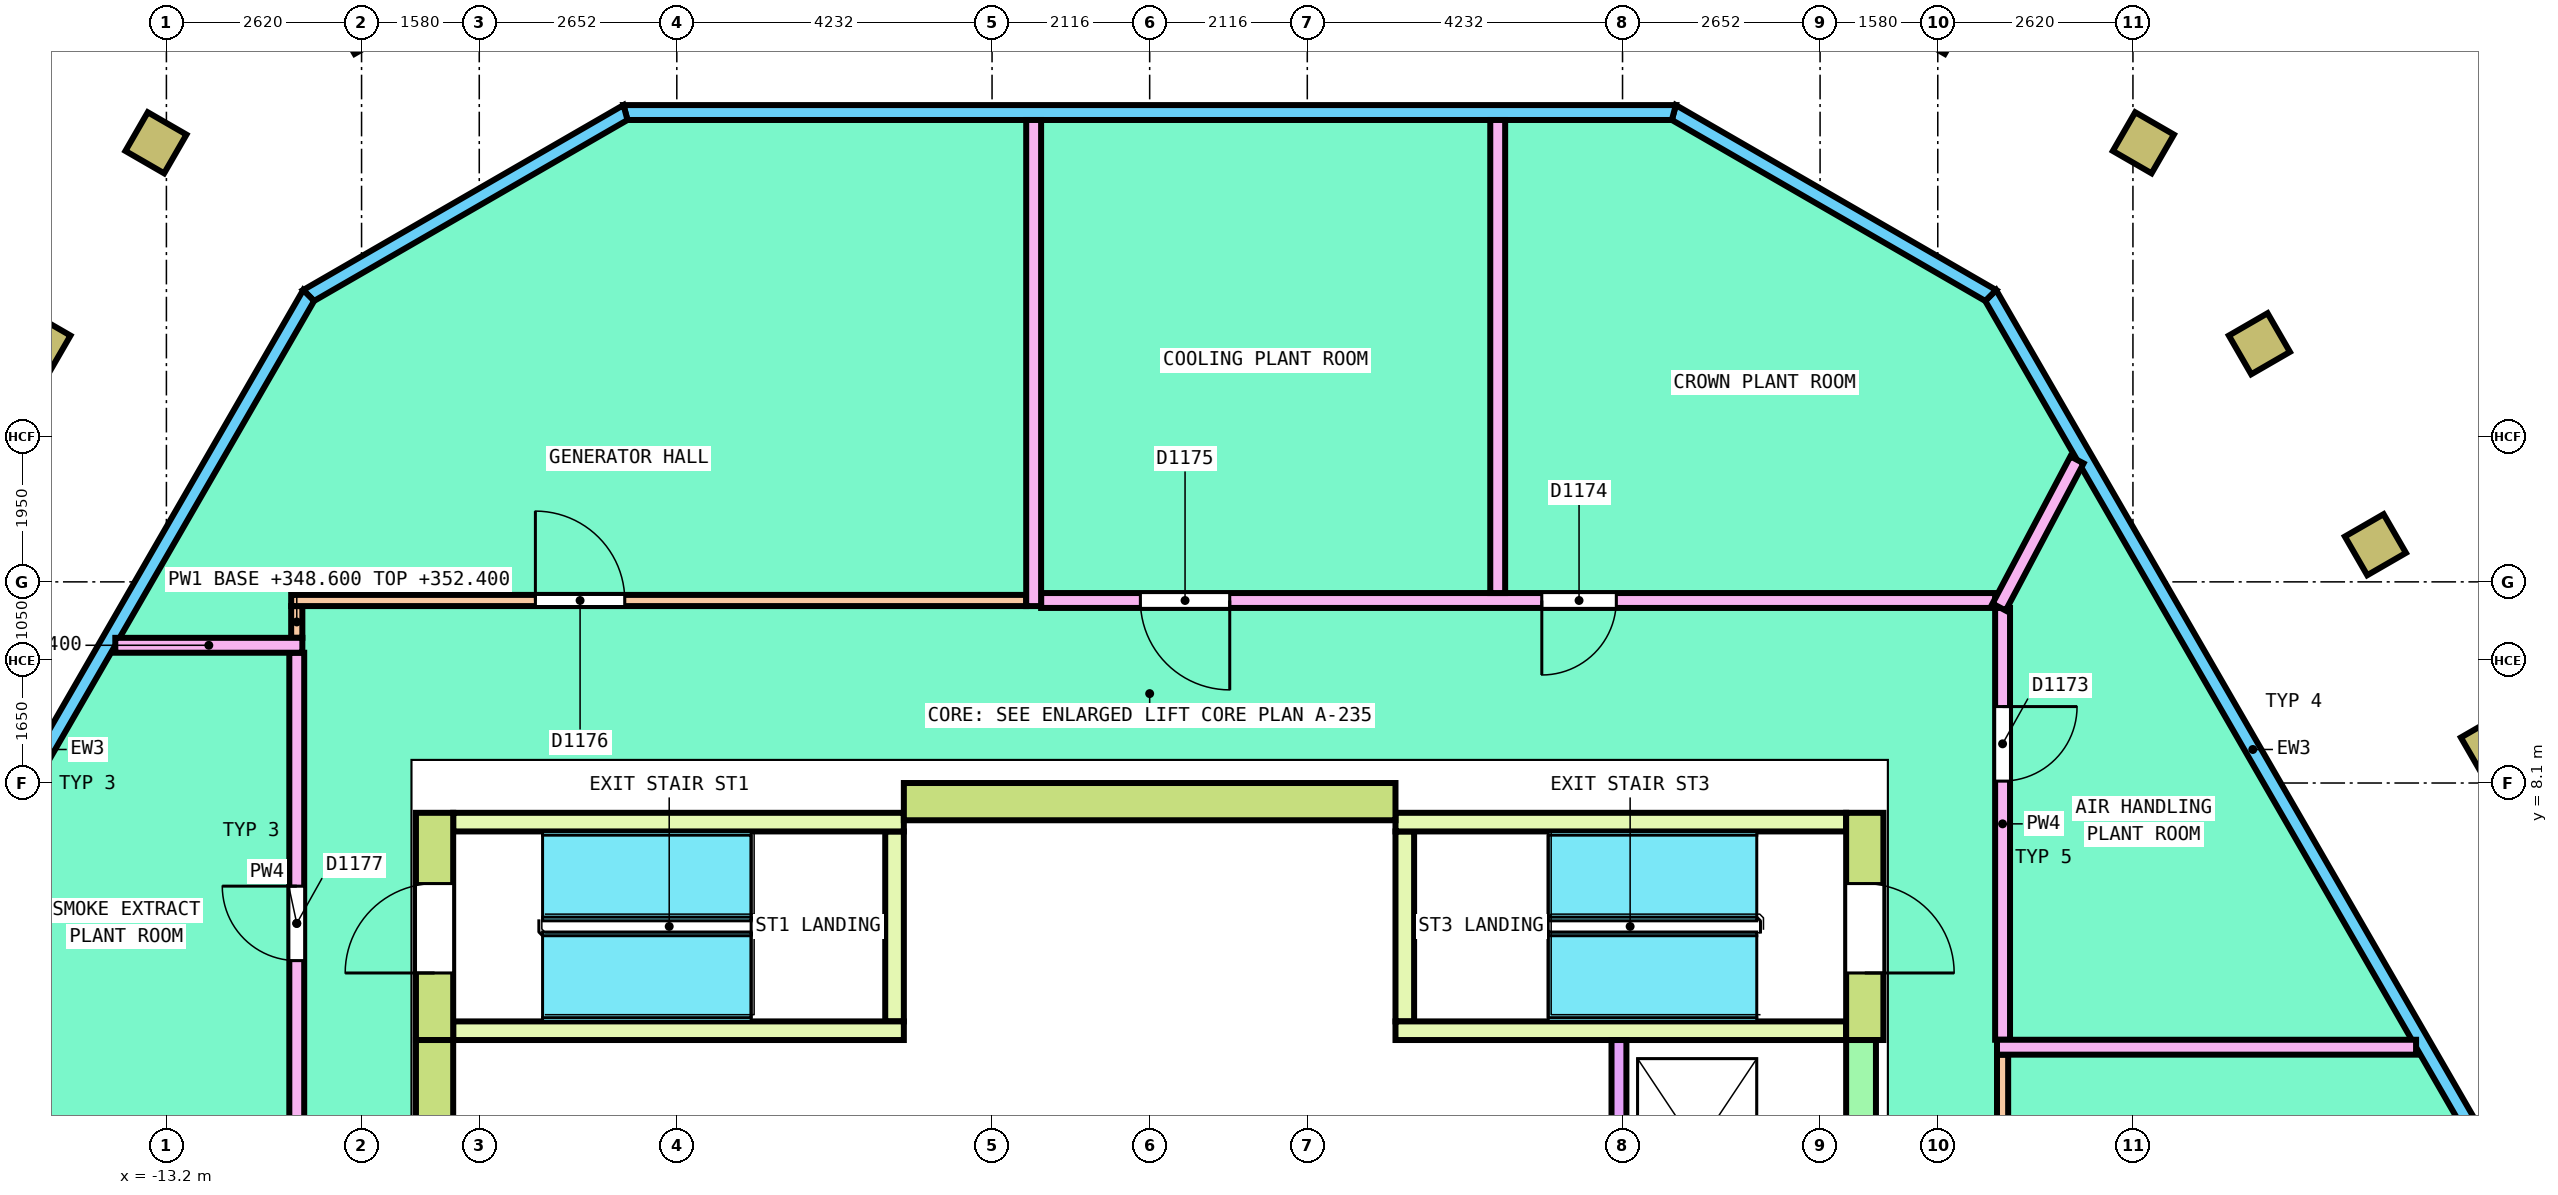
"""IFC4 building model, lengths in metres.
Left out: names, types, materials, properties, quantities, classifications, styles, units other than length and angle.
Written with IfcOpenShell. Run it as: python <this file> out.ifc"""

import sys

from ifc_helpers import new_model, si_unit, direction, frame, frame_2d, origin, origin_2d, place, context, subcontext, project, spatial, polyline, rectangle, hollow_rectangle, outline, extrude, element, fill, save


model = new_model("IFC4")
c1 = context("Model", 3, precision=1e-05, world=origin(), true_north=direction((0.0, 1.0)))
c2 = subcontext(c1, "Body", "Model", "MODEL_VIEW")
j1 = project(units=[si_unit("LENGTHUNIT", "METRE"), si_unit("PLANEANGLEUNIT", "RADIAN")], contexts=[c1])
p1 = place(None, origin())
s1 = spatial("IfcSite", under=j1, at=p1, CompositionType="ELEMENT")
p2 = place(p1, origin())
s2 = spatial("IfcBuilding", under=s1, at=p2, CompositionType="ELEMENT")
p3 = place(p2, frame((0.0, 0.0, 348.6)))
s3 = spatial("IfcBuildingStorey", under=s2, at=p3, CompositionType="ELEMENT", Elevation=348.6)
for number, where, z_axis, x_axis in (
    (1, (18.013, 8.601, 0.0), (0.0, 0.0, 1.0), (-0.5, 0.866, 0.0)),
    (2, (16.455, 11.299, 0.0), (0.0, 0.0, 1.0), (-0.5, 0.866, 0.0)),
    (3, (14.898, 13.996, 0.0), (0.0, 0.0, 1.0), (-0.5, 0.866, 0.0)),
    (4, (13.34, 16.694, 0.0), (0.0, 0.0, 1.0), (-0.866, 0.5, 0.0)),
    (5, (-13.34, 16.694, 0.0), (0.0, 0.0, 1.0), (-0.5, -0.866, 0.0)),
    (6, (-14.898, 13.996, 0.0), (0.0, 0.0, 1.0), (-0.5, -0.866, 0.0)),
):
    element("IfcColumn", number, at=place(p3, frame(where, z_axis=z_axis, x_axis=x_axis)), inside=s3, PredefinedType="COLUMN", context=c2, shape_type="SweptSolid", body=[
        extrude(hollow_rectangle(XDim=0.6, YDim=0.6, WallThickness=0.04, InnerFilletRadius=0.04, OuterFilletRadius=0.08, at=origin_2d()), origin(), (0.0, 0.0, 1.0), 4.0),
    ])
p4 = place(p3, frame((18.327, 2.456, 0.0), z_axis=(0.0, 0.0, 1.0), x_axis=(-0.499991740577, 0.866030172312, 0.0)))
e7 = element("IfcWall", 7, at=p4, inside=s3, PredefinedType="SOLIDWALL", context=c2, shape_type="SweptSolid", body=[
    extrude(outline(polyline([(-0.027, -0.1), (14.101, -0.1), (14.047, 0.1), (0.027, 0.1), (-0.027, -0.1)])), origin(), (0.0, 0.0, 1.0), 3.8),
])
p5 = place(p3, frame((11.291, 14.644, 0.0), z_axis=(0.0, 0.0, 1.0), x_axis=(-0.86601671623, 0.500015046984, 0.0)))
e8 = element("IfcWall", 8, at=p5, inside=s3, PredefinedType="SOLIDWALL", context=c2, shape_type="SweptSolid", body=[
    extrude(outline(polyline([(-0.027, -0.1), (4.938, -0.1), (4.885, 0.1), (0.027, 0.1), (-0.027, -0.1)])), origin(), (0.0, 0.0, 1.0), 3.8),
])
p6 = place(p3, frame((7.037, 17.1, 0.0), z_axis=(0.0, 0.0, 1.0), x_axis=(-1.0, 0.0, 0.0)))
e9 = element("IfcWall", 9, at=p6, inside=s3, PredefinedType="SOLIDWALL", context=c2, shape_type="SweptSolid", body=[
    extrude(outline(polyline([(-0.027, -0.1), (14.101, -0.1), (14.047, 0.1), (0.027, 0.1), (-0.027, -0.1)])), origin(), (0.0, 0.0, 1.0), 3.8),
])
p7 = place(p3, frame((-7.037, 17.1, 0.0), z_axis=(0.0, 0.0, 1.0), x_axis=(-0.86601671623, -0.500015046984, 0.0)))
e10 = element("IfcWall", 10, at=p7, inside=s3, PredefinedType="SOLIDWALL", context=c2, shape_type="SweptSolid", body=[
    extrude(outline(polyline([(-0.027, -0.1), (4.938, -0.1), (4.885, 0.1), (0.027, 0.1), (-0.027, -0.1)])), origin(), (0.0, 0.0, 1.0), 3.8),
])
p8 = place(p3, frame((-11.291, 14.644, 0.0), z_axis=(0.0, 0.0, 1.0), x_axis=(-0.499991740577, -0.866030172312, 0.0)))
e11 = element("IfcWall", 11, at=p8, inside=s3, PredefinedType="SOLIDWALL", context=c2, shape_type="SweptSolid", body=[
    extrude(outline(polyline([(-0.027, -0.1), (14.101, -0.1), (14.047, 0.1), (0.027, 0.1), (-0.027, -0.1)])), origin(), (0.0, 0.0, 1.0), 3.8),
])
p9 = place(p3, frame((3.3, 7.85, 0.0), z_axis=(0.0, 0.0, 1.0), x_axis=(-1.0, 0.0, 0.0)))
e12 = element("IfcWall", 12, at=p9, inside=s3, PredefinedType="SHEAR", context=c2, shape_type="SweptSolid", body=[
    extrude(rectangle(XDim=6.6, YDim=0.5, at=frame_2d((3.3, 0.0))), origin(), (0.0, 0.0, 1.0), 3.8),
])
p10 = place(p3, frame((-9.6, 4.65, 0.0), z_axis=(0.0, 0.0, 1.0), x_axis=(0.0, -1.0, 0.0)))
e13 = element("IfcWall", 13, at=p10, inside=s3, PredefinedType="SHEAR", context=c2, shape_type="SweptSolid", body=[
    extrude(rectangle(XDim=9.3, YDim=0.5, at=frame_2d((4.65, 0.0))), origin(), (0.0, 0.0, 1.0), 3.8),
])
p11 = place(p3, frame((-9.6, 4.65, 0.0), z_axis=(0.0, 0.0, 1.0), x_axis=(0.0, 1.0, 0.0)))
e14 = element("IfcWall", 14, at=p11, inside=s3, PredefinedType="SHEAR", context=c2, shape_type="SweptSolid", body=[
    extrude(rectangle(XDim=3.05, YDim=0.5, at=frame_2d((1.525, 0.0))), origin(), (0.0, 0.0, 1.0), 3.8),
])
p12 = place(p11, frame((0.9, 0.0, 0.0)))
e15 = element("IfcOpeningElement", 15, at=p12, cuts=e14, PredefinedType="OPENING", context=c2, shape_type="SweptSolid", body=[
    extrude(rectangle(XDim=1.2, YDim=2.1, at=frame_2d((0.6, 1.05))), frame((0.0, 0.26, 0.0), z_axis=(0.0, -1.0, 0.0), x_axis=(1.0, 0.0, 0.0)), (0.0, 0.0, 1.0), 0.52),
])
p13 = place(p3, frame((-3.425, 4.9, 0.0), z_axis=(0.0, 0.0, 1.0), x_axis=(0.0, 1.0, 0.0)))
e16 = element("IfcWall", 16, at=p13, inside=s3, PredefinedType="SOLIDWALL", context=c2, shape_type="SweptSolid", body=[
    extrude(rectangle(XDim=2.55, YDim=0.25, at=frame_2d((1.275, 0.0))), origin(), (0.0, 0.0, 1.0), 3.8),
])
for number, where, z_axis, x_axis in (
    (17, (-9.35, 4.775, 0.0), (0.0, 0.0, 1.0), (1.0, 0.0, 0.0)),
    (18, (-9.35, 7.575, 0.0), (0.0, 0.0, 1.0), (1.0, 0.0, 0.0)),
):
    element("IfcWall", number, at=place(p3, frame(where, z_axis=z_axis, x_axis=x_axis)), inside=s3, PredefinedType="SOLIDWALL", context=c2, shape_type="SweptSolid", body=[
        extrude(rectangle(XDim=6.05, YDim=0.25, at=frame_2d((3.025, 0.0))), origin(), (0.0, 0.0, 1.0), 3.8),
    ])
p14 = place(p3, frame((9.6, 4.65, 0.0), z_axis=(0.0, 0.0, 1.0), x_axis=(0.0, 1.0, 0.0)))
e19 = element("IfcWall", 19, at=p14, inside=s3, PredefinedType="SHEAR", context=c2, shape_type="SweptSolid", body=[
    extrude(rectangle(XDim=3.05, YDim=0.5, at=frame_2d((1.525, 0.0))), origin(), (0.0, 0.0, 1.0), 3.8),
])
p15 = place(p14, frame((0.9, 0.0, 0.0)))
e20 = element("IfcOpeningElement", 20, at=p15, cuts=e19, PredefinedType="OPENING", context=c2, shape_type="SweptSolid", body=[
    extrude(rectangle(XDim=1.2, YDim=2.1, at=frame_2d((0.6, 1.05))), frame((0.0, 0.26, 0.0), z_axis=(0.0, -1.0, 0.0), x_axis=(1.0, 0.0, 0.0)), (0.0, 0.0, 1.0), 0.52),
])
p16 = place(p3, frame((3.425, 4.9, 0.0), z_axis=(0.0, 0.0, 1.0), x_axis=(0.0, 1.0, 0.0)))
e21 = element("IfcWall", 21, at=p16, inside=s3, PredefinedType="SOLIDWALL", context=c2, shape_type="SweptSolid", body=[
    extrude(rectangle(XDim=2.55, YDim=0.25, at=frame_2d((1.275, 0.0))), origin(), (0.0, 0.0, 1.0), 3.8),
])
for number, where, z_axis, x_axis in (
    (22, (3.3, 4.775, 0.0), (0.0, 0.0, 1.0), (1.0, 0.0, 0.0)),
    (23, (3.3, 7.575, 0.0), (0.0, 0.0, 1.0), (1.0, 0.0, 0.0)),
):
    element("IfcWall", number, at=place(p3, frame(where, z_axis=z_axis, x_axis=x_axis)), inside=s3, PredefinedType="SOLIDWALL", context=c2, shape_type="SweptSolid", body=[
        extrude(rectangle(XDim=6.05, YDim=0.25, at=frame_2d((3.025, 0.0))), origin(), (0.0, 0.0, 1.0), 3.8),
    ])
p17 = place(p3, frame((6.3, 1.75, 0.0), z_axis=(0.0, 0.0, 1.0), x_axis=(0.0, 1.0, 0.0)))
e24 = element("IfcWall", 24, at=p17, inside=s3, PredefinedType="SOLIDWALL", context=c2, shape_type="SweptSolid", body=[
    extrude(rectangle(XDim=2.9, YDim=0.2, at=frame_2d((1.45, 0.0))), origin(), (0.0, 0.0, 1.0), 3.8),
])
p18 = place(p3, frame((9.55, 1.5, 0.0), z_axis=(0.0, 0.0, 1.0), x_axis=(0.0, 1.0, 0.0)))
e25 = element("IfcWall", 25, at=p18, inside=s3, PredefinedType="SHEAR", context=c2, shape_type="SweptSolid", body=[
    extrude(rectangle(XDim=3.15, YDim=0.4, at=frame_2d((1.575, 0.0))), origin(), (0.0, 0.0, 1.0), 3.8),
])
p19 = place(p3, frame((11.45, -2.383, 0.0), z_axis=(0.0, 0.0, 1.0), x_axis=(0.0, 1.0, 0.0)))
e26 = element("IfcWall", 26, at=p19, inside=s3, PredefinedType="PARTITIONING", context=c2, shape_type="SweptSolid", body=[
    extrude(rectangle(XDim=6.836, YDim=0.15, at=frame_2d((3.418, 0.0))), origin(), (0.0, 0.0, 1.0), 3.3),
])
p20 = place(p19, frame((1.534, 0.0, 0.0)))
e27 = element("IfcOpeningElement", 27, at=p20, cuts=e26, PredefinedType="OPENING", context=c2, shape_type="SweptSolid", body=[
    extrude(rectangle(XDim=1.2, YDim=2.1, at=frame_2d((0.6, 1.05))), frame((0.0, 0.085, 0.0), z_axis=(0.0, -1.0, 0.0), x_axis=(1.0, 0.0, 0.0)), (0.0, 0.0, 1.0), 0.17),
])
p21 = place(p3, frame((-11.45, 10.049, 0.0), z_axis=(0.0, 0.0, 1.0), x_axis=(0.0, 1.0, 0.0)))
e28 = element("IfcWall", 28, at=p21, inside=s3, PredefinedType="PARTITIONING", context=c2, shape_type="SweptSolid", body=[
    extrude(rectangle(XDim=0.426, YDim=0.15, at=frame_2d((0.213, 0.0))), origin(), (0.0, 0.0, 1.0), 3.8),
])
p22 = place(p3, frame((-11.525, 10.55, 0.0), z_axis=(0.0, 0.0, 1.0), x_axis=(1.0, 0.0, 0.0)))
e29 = element("IfcWall", 29, at=p22, inside=s3, PredefinedType="PARTITIONING", context=c2, shape_type="SweptSolid", body=[
    extrude(rectangle(XDim=9.867, YDim=0.15, at=frame_2d((4.934, 0.0))), origin(), (0.0, 0.0, 1.0), 3.3),
])
p23 = place(p22, frame((3.279, 0.0, 0.0)))
e30 = element("IfcOpeningElement", 30, at=p23, cuts=e29, PredefinedType="OPENING", context=c2, shape_type="SweptSolid", body=[
    extrude(rectangle(XDim=1.2, YDim=2.1, at=frame_2d((0.6, 1.05))), frame((0.0, 0.085, 0.0), z_axis=(0.0, -1.0, 0.0), x_axis=(1.0, 0.0, 0.0)), (0.0, 0.0, 1.0), 0.17),
])
p24 = place(p3, frame((11.45, 4.654, 0.0), z_axis=(0.0, 0.0, 1.0), x_axis=(0.0, 1.0, 0.0)))
e31 = element("IfcWall", 31, at=p24, inside=s3, PredefinedType="PARTITIONING", context=c2, shape_type="SweptSolid", body=[
    extrude(rectangle(XDim=5.796, YDim=0.2, at=frame_2d((2.898, 0.0))), origin(), (0.0, 0.0, 1.0), 3.3),
])
p25 = place(p24, frame((3.472, 0.0, 0.0)))
e32 = element("IfcOpeningElement", 32, at=p25, cuts=e31, PredefinedType="OPENING", context=c2, shape_type="SweptSolid", body=[
    extrude(rectangle(XDim=1.0, YDim=2.1, at=frame_2d((0.5, 1.05))), frame((0.0, 0.11, 0.0), z_axis=(0.0, -1.0, 0.0), x_axis=(1.0, 0.0, 0.0)), (0.0, 0.0, 1.0), 0.22),
])
p26 = place(p3, frame((-1.458, 10.55, 0.0), z_axis=(0.0, 0.0, 1.0), x_axis=(1.0, 0.0, 0.0)))
e33 = element("IfcWall", 33, at=p26, inside=s3, PredefinedType="PARTITIONING", context=c2, shape_type="SweptSolid", body=[
    extrude(rectangle(XDim=12.808, YDim=0.2, at=frame_2d((6.404, 0.0))), origin(), (0.0, 0.0, 1.0), 3.3),
])
p27 = place(p26, frame((6.722, 0.0, 0.0)))
e34 = element("IfcOpeningElement", 34, at=p27, cuts=e33, PredefinedType="OPENING", context=c2, shape_type="SweptSolid", body=[
    extrude(rectangle(XDim=1.0, YDim=2.1, at=frame_2d((0.5, 1.05))), frame((0.0, 0.11, 0.0), z_axis=(0.0, -1.0, 0.0), x_axis=(1.0, 0.0, 0.0)), (0.0, 0.0, 1.0), 0.22),
])
p28 = place(p26, frame((1.333, 0.0, 0.0)))
e35 = element("IfcOpeningElement", 35, at=p28, cuts=e33, PredefinedType="OPENING", context=c2, shape_type="SweptSolid", body=[
    extrude(rectangle(XDim=1.2, YDim=2.1, at=frame_2d((0.6, 1.05))), frame((0.0, 0.11, 0.0), z_axis=(0.0, -1.0, 0.0), x_axis=(1.0, 0.0, 0.0)), (0.0, 0.0, 1.0), 0.22),
])
p29 = place(p3, frame((-11.45, 2.583, 0.0), z_axis=(0.0, 0.0, 1.0), x_axis=(0.0, 1.0, 0.0)))
e36 = element("IfcWall", 36, at=p29, inside=s3, PredefinedType="PARTITIONING", context=c2, shape_type="SweptSolid", body=[
    extrude(rectangle(XDim=7.266, YDim=0.2, at=frame_2d((3.633, 0.0))), origin(), (0.0, 0.0, 1.0), 3.3),
])
p30 = place(p29, frame((3.133, 0.0, 0.0)))
e37 = element("IfcOpeningElement", 37, at=p30, cuts=e36, PredefinedType="OPENING", context=c2, shape_type="SweptSolid", body=[
    extrude(rectangle(XDim=1.0, YDim=2.1, at=frame_2d((0.5, 1.05))), frame((0.0, 0.11, 0.0), z_axis=(0.0, -1.0, 0.0), x_axis=(1.0, 0.0, 0.0)), (0.0, 0.0, 1.0), 0.22),
])
p31 = place(p3, frame((11.375, 4.554, 0.0), z_axis=(0.0, 0.0, 1.0), x_axis=(1.0, 0.0, 0.0)))
e38 = element("IfcWall", 38, at=p31, inside=s3, PredefinedType="PARTITIONING", context=c2, shape_type="SweptSolid", body=[
    extrude(rectangle(XDim=5.626, YDim=0.2, at=frame_2d((2.813, 0.0))), origin(), (0.0, 0.0, 1.0), 3.3),
])
p32 = place(p3, frame((11.403, 10.462, 0.0), z_axis=(0.0, 0.0, 1.0), x_axis=(0.467712102585, 0.883880868158, 0.0)))
e39 = element("IfcWall", 39, at=p32, inside=s3, PredefinedType="PARTITIONING", context=c2, shape_type="SweptSolid", body=[
    extrude(rectangle(XDim=2.236, YDim=0.2, at=frame_2d((1.118, 0.0))), origin(), (0.0, 0.0, 1.0), 3.3),
])
p33 = place(p3, frame((4.672, 10.65, 0.0), z_axis=(0.0, 0.0, 1.0), x_axis=(0.0, 1.0, 0.0)))
e40 = element("IfcWall", 40, at=p33, inside=s3, PredefinedType="PARTITIONING", context=c2, shape_type="SweptSolid", body=[
    extrude(rectangle(XDim=6.35, YDim=0.2, at=frame_2d((3.175, 0.0))), origin(), (0.0, 0.0, 1.0), 3.3),
])
p34 = place(p3, frame((-1.557, 10.475, 0.0), z_axis=(0.0, 0.0, 1.0), x_axis=(0.0, 1.0, 0.0)))
e41 = element("IfcWall", 41, at=p34, inside=s3, PredefinedType="PARTITIONING", context=c2, shape_type="SweptSolid", body=[
    extrude(rectangle(XDim=6.525, YDim=0.2, at=frame_2d((3.262, 0.0))), origin(), (0.0, 0.0, 1.0), 3.3),
])
p35 = place(p3, frame((-13.886, 9.949, 0.0), z_axis=(0.0, 0.0, 1.0), x_axis=(1.0, 0.0, 0.0)))
e42 = element("IfcWall", 42, at=p35, inside=s3, PredefinedType="PARTITIONING", context=c2, shape_type="SweptSolid", body=[
    extrude(rectangle(XDim=2.511, YDim=0.2, at=frame_2d((1.255, 0.0))), origin(), (0.0, 0.0, 1.0), 3.8),
])
p36 = place(p12, origin())
e43 = element("IfcDoor", 43, at=p36, inside=s3, OperationType="SINGLE_SWING_RIGHT", PredefinedType="DOOR", context=c2, shape_type="SweptSolid", body=[
    extrude(rectangle(XDim=1.2, YDim=2.1, at=frame_2d((0.6, 1.05))), frame((0.0, 0.2, 0.0), z_axis=(0.0, -1.0, 0.0), x_axis=(1.0, 0.0, 0.0)), (0.0, 0.0, 1.0), 0.4),
])
fill(e15, e43)
p37 = place(p15, origin())
e44 = element("IfcDoor", 44, at=p37, inside=s3, OperationType="SINGLE_SWING_RIGHT", PredefinedType="DOOR", context=c2, shape_type="SweptSolid", body=[
    extrude(rectangle(XDim=1.2, YDim=2.1, at=frame_2d((0.6, 1.05))), frame((0.0, 0.2, 0.0), z_axis=(0.0, -1.0, 0.0), x_axis=(1.0, 0.0, 0.0)), (0.0, 0.0, 1.0), 0.4),
])
fill(e20, e44)
p38 = place(p25, origin())
e45 = element("IfcDoor", 45, at=p38, inside=s3, OperationType="SINGLE_SWING_LEFT", PredefinedType="DOOR", context=c2, shape_type="SweptSolid", body=[
    extrude(rectangle(XDim=1.0, YDim=2.1, at=frame_2d((0.5, 1.05))), frame((0.0, 0.025, 0.0), z_axis=(0.0, -1.0, 0.0), x_axis=(1.0, 0.0, 0.0)), (0.0, 0.0, 1.0), 0.05),
])
fill(e32, e45)
p39 = place(p27, origin())
e46 = element("IfcDoor", 46, at=p39, inside=s3, OperationType="SINGLE_SWING_RIGHT", PredefinedType="DOOR", context=c2, shape_type="SweptSolid", body=[
    extrude(rectangle(XDim=1.0, YDim=2.1, at=frame_2d((0.5, 1.05))), frame((0.0, 0.025, 0.0), z_axis=(0.0, -1.0, 0.0), x_axis=(1.0, 0.0, 0.0)), (0.0, 0.0, 1.0), 0.05),
])
fill(e34, e46)
p40 = place(p28, origin())
e47 = element("IfcDoor", 47, at=p40, inside=s3, OperationType="DOUBLE_DOOR_SINGLE_SWING", PredefinedType="DOOR", context=c2, shape_type="SweptSolid", body=[
    extrude(rectangle(XDim=1.2, YDim=2.1, at=frame_2d((0.6, 1.05))), frame((0.0, 0.025, 0.0), z_axis=(0.0, -1.0, 0.0), x_axis=(1.0, 0.0, 0.0)), (0.0, 0.0, 1.0), 0.05),
])
fill(e35, e47)
p41 = place(p23, origin())
e48 = element("IfcDoor", 48, at=p41, inside=s3, OperationType="DOUBLE_DOOR_SINGLE_SWING", PredefinedType="DOOR", context=c2, shape_type="SweptSolid", body=[
    extrude(rectangle(XDim=1.2, YDim=2.1, at=frame_2d((0.6, 1.05))), frame((0.0, 0.025, 0.0), z_axis=(0.0, -1.0, 0.0), x_axis=(1.0, 0.0, 0.0)), (0.0, 0.0, 1.0), 0.05),
])
fill(e30, e48)
p42 = place(p30, origin())
e49 = element("IfcDoor", 49, at=p42, inside=s3, OperationType="SINGLE_SWING_RIGHT", PredefinedType="DOOR", context=c2, shape_type="SweptSolid", body=[
    extrude(rectangle(XDim=1.0, YDim=2.1, at=frame_2d((0.5, 1.05))), frame((0.0, 0.025, 0.0), z_axis=(0.0, -1.0, 0.0), x_axis=(1.0, 0.0, 0.0)), (0.0, 0.0, 1.0), 0.05),
])
fill(e37, e49)
save(model, sys.argv[1])
